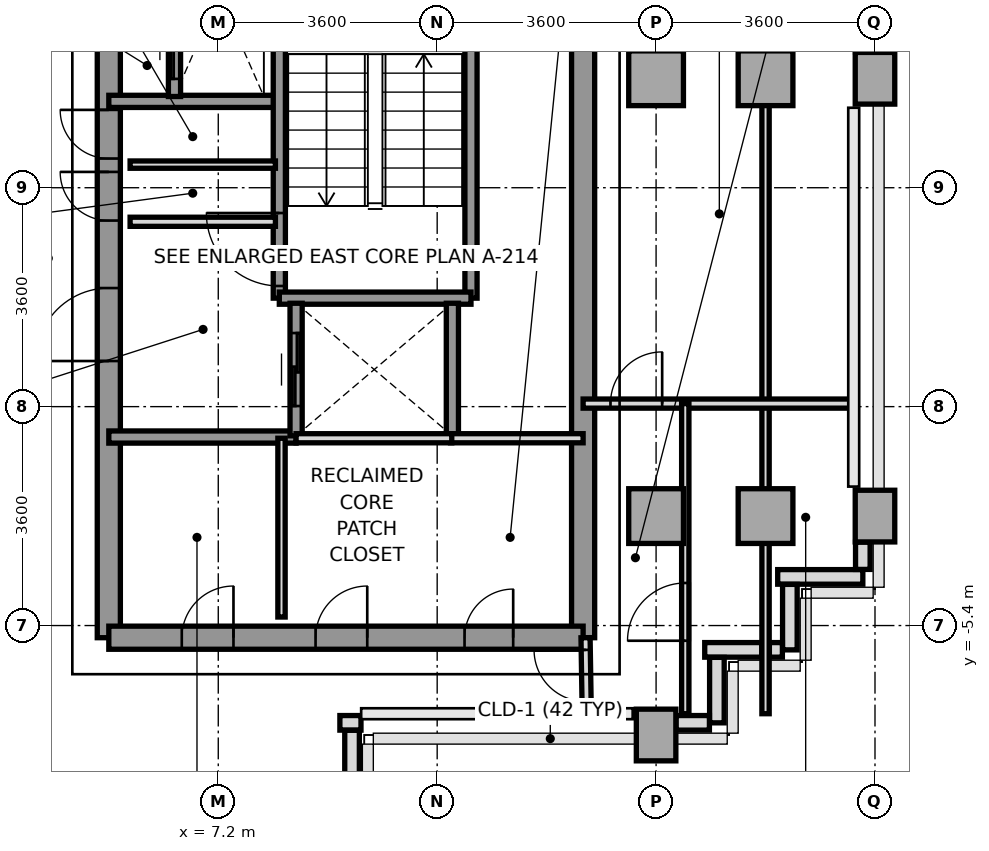
"""IFC4 building model, lengths in metres.
Left out: names, types, materials, properties, quantities, classifications, styles, units other than length and angle.
Written with IfcOpenShell. Run it as: python <this file> out.ifc"""

import sys

from ifc_helpers import new_model, si_unit, direction, frame, frame_2d, origin, origin_2d, place, context, subcontext, project, spatial, rectangle, extrude, source, transform, mapped, element, fill, save


model = new_model("IFC4")
c1 = context("Model", 3, precision=1e-05, world=origin(), true_north=direction((0.0, 1.0)))
c2 = subcontext(c1, "Body", "Model", "MODEL_VIEW")
j1 = project(units=[si_unit("LENGTHUNIT", "METRE"), si_unit("PLANEANGLEUNIT", "RADIAN")], contexts=[c1])
p1 = place(None, origin())
s1 = spatial("IfcSite", under=j1, at=p1, CompositionType="ELEMENT")
p2 = place(p1, origin())
s2 = spatial("IfcBuilding", under=s1, at=p2, CompositionType="ELEMENT")
p3 = place(p2, frame((0.0, 0.0, 187.6)))
s3 = spatial("IfcBuildingStorey", under=s2, at=p3, CompositionType="ELEMENT", Elevation=187.6)
m1 = source(origin(), c2, "Body", "SweptSolid", [
    extrude(rectangle(XDim=0.65, YDim=0.85, at=origin_2d()), origin(), (0.0, 0.0, 1.0), 3.2),
])
p4 = place(p3, frame((14.4, -7.2, 0.0), z_axis=(0.0, 0.0, 1.0), x_axis=(1.0, 0.0, 0.0)))
e1 = element("IfcColumn", 1, at=p4, inside=s3, PredefinedType="COLUMN", context=c2, shape_type="MappedRepresentation", body=[
    mapped(m1, transform((0.0, 0.0, 0.0), x_axis=(1.0, 0.0, 0.0), y_axis=(0.0, 1.0, 0.0), z_axis=(0.0, 0.0, 1.0), scale=1.0)),
])
m2 = source(origin(), c2, "Body", "SweptSolid", [
    extrude(rectangle(XDim=0.9, YDim=0.9, at=origin_2d()), origin(), (0.0, 0.0, 1.0), 3.2),
])
for number, where, z_axis, x_axis in (
    (2, (14.4, -3.6, 0.0), (0.0, 0.0, 1.0), (1.0, 0.0, 0.0)),
    (3, (14.4, 3.6, 0.0), (0.0, 0.0, 1.0), (1.0, 0.0, 0.0)),
    (4, (16.2, -3.6, 0.0), (0.0, 0.0, 1.0), (1.0, 0.0, 0.0)),
    (5, (16.2, 3.6, 0.0), (0.0, 0.0, 1.0), (1.0, 0.0, 0.0)),
):
    element("IfcColumn", number, at=place(p3, frame(where, z_axis=z_axis, x_axis=x_axis)), inside=s3, PredefinedType="COLUMN", context=c2, shape_type="MappedRepresentation", body=[
        mapped(m2, transform((0.0, 0.0, 0.0), x_axis=(1.0, 0.0, 0.0), y_axis=(0.0, 1.0, 0.0), z_axis=(0.0, 0.0, 1.0), scale=1.0)),
    ])
for number, where, z_axis, x_axis in (
    (6, (18.0, -3.6, 0.0), (0.0, 0.0, 1.0), (1.0, 0.0, 0.0)),
    (7, (18.0, 3.6, 0.0), (0.0, 0.0, 1.0), (1.0, 0.0, 0.0)),
):
    element("IfcColumn", number, at=place(p3, frame(where, z_axis=z_axis, x_axis=x_axis)), inside=s3, PredefinedType="COLUMN", context=c2, shape_type="MappedRepresentation", body=[
        mapped(m1, transform((0.0, 0.0, 0.0), x_axis=(1.0, 0.0, 0.0), y_axis=(0.0, 1.0, 0.0), z_axis=(0.0, 0.0, 1.0), scale=1.0)),
    ])
p5 = place(p3, frame((17.8, -4.6, 0.0), z_axis=(0.0, 0.0, 1.0), x_axis=(-1.0, 0.0, 0.0)))
e8 = element("IfcWall", 8, at=p5, inside=s3, PredefinedType="PARAPET", context=c2, shape_type="SweptSolid", body=[
    extrude(rectangle(XDim=1.4, YDim=0.24, at=frame_2d((0.7, 0.0))), origin(), (0.0, 0.0, 1.0), 1.15),
])
p6 = place(p3, frame((16.6, -4.723, 0.0), z_axis=(0.0, 0.0, 1.0), x_axis=(0.0, -1.0, 0.0)))
e9 = element("IfcWall", 9, at=p6, inside=s3, PredefinedType="PARAPET", context=c2, shape_type="SweptSolid", body=[
    extrude(rectangle(XDim=1.077, YDim=0.24, at=frame_2d((0.539, 0.0))), origin(), (0.0, 0.0, 1.0), 1.15),
])
p7 = place(p3, frame((16.477, -5.8, 0.0), z_axis=(0.0, 0.0, 1.0), x_axis=(-1.0, 0.0, 0.0)))
e10 = element("IfcWall", 10, at=p7, inside=s3, PredefinedType="PARAPET", context=c2, shape_type="SweptSolid", body=[
    extrude(rectangle(XDim=0.214, YDim=0.24, at=frame_2d((0.107, 0.0))), origin(), (0.0, 0.0, 1.0), 1.15),
])
p8 = place(p3, frame((16.137, -5.8, 0.0), z_axis=(0.0, 0.0, 1.0), x_axis=(-1.0, 0.0, 0.0)))
e11 = element("IfcWall", 11, at=p8, inside=s3, PredefinedType="PARAPET", context=c2, shape_type="SweptSolid", body=[
    extrude(rectangle(XDim=0.937, YDim=0.24, at=frame_2d((0.469, 0.0))), origin(), (0.0, 0.0, 1.0), 1.15),
])
p9 = place(p3, frame((15.4, -5.923, 0.0), z_axis=(0.0, 0.0, 1.0), x_axis=(0.0, -1.0, 0.0)))
e12 = element("IfcWall", 12, at=p9, inside=s3, PredefinedType="PARAPET", context=c2, shape_type="SweptSolid", body=[
    extrude(rectangle(XDim=1.077, YDim=0.24, at=frame_2d((0.539, 0.0))), origin(), (0.0, 0.0, 1.0), 1.15),
])
p10 = place(p3, frame((15.277, -7.0, 0.0), z_axis=(0.0, 0.0, 1.0), x_axis=(-1.0, 0.0, 0.0)))
e13 = element("IfcWall", 13, at=p10, inside=s3, PredefinedType="PARAPET", context=c2, shape_type="SweptSolid", body=[
    extrude(rectangle(XDim=0.549, YDim=0.24, at=frame_2d((0.274, 0.0))), origin(), (0.0, 0.0, 1.0), 1.15),
])
p11 = place(p3, frame((9.547, -7.0, 0.0), z_axis=(0.0, 0.0, 1.0), x_axis=(-1.0, 0.0, 0.0)))
e14 = element("IfcWall", 14, at=p11, inside=s3, PredefinedType="PARAPET", context=c2, shape_type="SweptSolid", body=[
    extrude(rectangle(XDim=0.347, YDim=0.24, at=frame_2d((0.174, 0.0))), origin(), (0.0, 0.0, 1.0), 1.15),
])
p12 = place(p3, frame((9.4, -7.123, 0.0), z_axis=(0.0, 0.0, 1.0), x_axis=(0.0, -1.0, 0.0)))
e15 = element("IfcWall", 15, at=p12, inside=s3, PredefinedType="PARAPET", context=c2, shape_type="SweptSolid", body=[
    extrude(rectangle(XDim=1.424, YDim=0.24, at=frame_2d((0.712, 0.0))), origin(), (0.0, 0.0, 1.0), 1.15),
])
for number, where, z_axis, x_axis in (
    (16, (17.8, 4.477, 0.0), (0.0, 0.0, 1.0), (0.0, -1.0, 0.0)),
    (17, (17.8, -4.028, 0.0), (0.0, 0.0, 1.0), (0.0, -1.0, 0.0)),
):
    element("IfcWall", number, at=place(p3, frame(where, z_axis=z_axis, x_axis=x_axis)), inside=s3, PredefinedType="PARAPET", context=c2, shape_type="SweptSolid", body=[
        extrude(rectangle(XDim=0.449, YDim=0.24, at=frame_2d((0.225, 0.0))), origin(), (0.0, 0.0, 1.0), 1.15),
    ])
p13 = place(p3, frame((13.2, -5.6, 0.0), z_axis=(0.0, 0.0, 1.0), x_axis=(0.0, 1.0, 0.0)))
e18 = element("IfcWall", 18, at=p13, inside=s3, PredefinedType="SHEAR", context=c2, shape_type="SweptSolid", body=[
    extrude(rectangle(XDim=11.2, YDim=0.38, at=frame_2d((5.6, 0.0))), origin(), (0.0, 0.0, 1.0), 3.2),
])
p14 = place(p3, frame((5.4, -5.6, 0.0), z_axis=(0.0, 0.0, 1.0), x_axis=(0.0, 1.0, 0.0)))
e19 = element("IfcWall", 19, at=p14, inside=s3, PredefinedType="SHEAR", context=c2, shape_type="SweptSolid", body=[
    extrude(rectangle(XDim=12.5, YDim=0.38, at=frame_2d((6.25, 0.0))), origin(), (0.0, 0.0, 1.0), 3.2),
])
p15 = place(p14, frame((4.55, 0.0, 0.0)))
e20 = element("IfcOpeningElement", 20, at=p15, cuts=e19, PredefinedType="OPENING", context=c2, shape_type="SweptSolid", body=[
    extrude(rectangle(XDim=1.2, YDim=2.2, at=frame_2d((0.6, 1.1))), frame((0.0, 0.2, 0.0), z_axis=(0.0, -1.0, 0.0), x_axis=(1.0, 0.0, 0.0)), (0.0, 0.0, 1.0), 0.4),
])
p16 = place(p14, frame((10.45, 0.0, 0.0)))
e21 = element("IfcOpeningElement", 21, at=p16, cuts=e19, PredefinedType="OPENING", context=c2, shape_type="SweptSolid", body=[
    extrude(rectangle(XDim=1.2, YDim=2.2, at=frame_2d((0.6, 1.1))), frame((0.0, 0.2, 0.0), z_axis=(0.0, -1.0, 0.0), x_axis=(1.0, 0.0, 0.0)), (0.0, 0.0, 1.0), 0.4),
])
p17 = place(p14, frame((6.86, 0.0, 0.0)))
e22 = element("IfcOpeningElement", 22, at=p17, cuts=e19, PredefinedType="OPENING", context=c2, shape_type="SweptSolid", body=[
    extrude(rectangle(XDim=0.8, YDim=2.1, at=frame_2d((0.4, 1.05))), frame((0.0, 0.2, 0.0), z_axis=(0.0, -1.0, 0.0), x_axis=(1.0, 0.0, 0.0)), (0.0, 0.0, 1.0), 0.4),
])
p18 = place(p14, frame((7.88, 0.0, 0.0)))
e23 = element("IfcOpeningElement", 23, at=p18, cuts=e19, PredefinedType="OPENING", context=c2, shape_type="SweptSolid", body=[
    extrude(rectangle(XDim=0.8, YDim=2.1, at=frame_2d((0.4, 1.05))), frame((0.0, 0.2, 0.0), z_axis=(0.0, -1.0, 0.0), x_axis=(1.0, 0.0, 0.0)), (0.0, 0.0, 1.0), 0.4),
])
p19 = place(p3, frame((5.4, -5.6, 0.0), z_axis=(0.0, 0.0, 1.0), x_axis=(1.0, 0.0, 0.0)))
e24 = element("IfcWall", 24, at=p19, inside=s3, PredefinedType="SHEAR", context=c2, shape_type="SweptSolid", body=[
    extrude(rectangle(XDim=7.8, YDim=0.38, at=frame_2d((3.9, 0.0))), origin(), (0.0, 0.0, 1.0), 3.2),
])
p20 = place(p19, frame((5.85, 0.0, 0.0)))
e25 = element("IfcOpeningElement", 25, at=p20, cuts=e24, PredefinedType="OPENING", context=c2, shape_type="SweptSolid", body=[
    extrude(rectangle(XDim=0.8, YDim=2.1, at=frame_2d((0.4, 1.05))), frame((0.0, 0.2, 0.0), z_axis=(0.0, -1.0, 0.0), x_axis=(1.0, 0.0, 0.0)), (0.0, 0.0, 1.0), 0.4),
])
p21 = place(p19, frame((1.2, 0.0, 0.0)))
e26 = element("IfcOpeningElement", 26, at=p21, cuts=e24, PredefinedType="OPENING", context=c2, shape_type="SweptSolid", body=[
    extrude(rectangle(XDim=0.85, YDim=2.1, at=frame_2d((0.425, 1.05))), frame((0.0, 0.2, 0.0), z_axis=(0.0, -1.0, 0.0), x_axis=(1.0, 0.0, 0.0)), (0.0, 0.0, 1.0), 0.4),
])
p22 = place(p19, frame((3.4, 0.0, 0.0)))
e27 = element("IfcOpeningElement", 27, at=p22, cuts=e24, PredefinedType="OPENING", context=c2, shape_type="SweptSolid", body=[
    extrude(rectangle(XDim=0.85, YDim=2.1, at=frame_2d((0.425, 1.05))), frame((0.0, 0.2, 0.0), z_axis=(0.0, -1.0, 0.0), x_axis=(1.0, 0.0, 0.0)), (0.0, 0.0, 1.0), 0.4),
])
p23 = place(p3, frame((5.4, 3.22, 0.0), z_axis=(0.0, 0.0, 1.0), x_axis=(1.0, 0.0, 0.0)))
e28 = element("IfcWall", 28, at=p23, inside=s3, PredefinedType="SOLIDWALL", context=c2, shape_type="SweptSolid", body=[
    extrude(rectangle(XDim=2.78, YDim=0.2, at=frame_2d((1.39, 0.0))), origin(), (0.0, 0.0, 1.0), 3.2),
])
p24 = place(p3, frame((5.4, -2.3, 0.0), z_axis=(0.0, 0.0, 1.0), x_axis=(1.0, 0.0, 0.0)))
e29 = element("IfcWall", 29, at=p24, inside=s3, PredefinedType="SOLIDWALL", context=c2, shape_type="SweptSolid", body=[
    extrude(rectangle(XDim=3.08, YDim=0.2, at=frame_2d((1.54, 0.0))), origin(), (0.0, 0.0, 1.0), 3.2),
])
p25 = place(p3, frame((8.204, -0.016, 0.0), z_axis=(0.0, 0.0, 1.0), x_axis=(0.0, 1.0, 0.0)))
e30 = element("IfcWall", 30, at=p25, inside=s3, PredefinedType="SOLIDWALL", context=c2, shape_type="SweptSolid", body=[
    extrude(rectangle(XDim=6.916, YDim=0.2, at=frame_2d((3.458, 0.0))), origin(), (0.0, 0.0, 1.0), 3.2),
])
p26 = place(p25, frame((0.2, 0.0, 0.0)))
e31 = element("IfcOpeningElement", 31, at=p26, cuts=e30, PredefinedType="OPENING", context=c2, shape_type="SweptSolid", body=[
    extrude(rectangle(XDim=1.2, YDim=2.2, at=frame_2d((0.6, 1.1))), frame((0.0, 0.11, 0.0), z_axis=(0.0, -1.0, 0.0), x_axis=(1.0, 0.0, 0.0)), (0.0, 0.0, 1.0), 0.22),
])
p27 = place(p3, frame((11.356, -0.016, 0.0), z_axis=(0.0, 0.0, 1.0), x_axis=(0.0, 1.0, 0.0)))
e32 = element("IfcWall", 32, at=p27, inside=s3, PredefinedType="SOLIDWALL", context=c2, shape_type="SweptSolid", body=[
    extrude(rectangle(XDim=6.916, YDim=0.2, at=frame_2d((3.458, 0.0))), origin(), (0.0, 0.0, 1.0), 3.2),
])
p28 = place(p3, frame((8.204, -0.016, 0.0), z_axis=(0.0, 0.0, 1.0), x_axis=(1.0, 0.0, 0.0)))
e33 = element("IfcWall", 33, at=p28, inside=s3, PredefinedType="SOLIDWALL", context=c2, shape_type="SweptSolid", body=[
    extrude(rectangle(XDim=3.152, YDim=0.2, at=frame_2d((1.576, 0.0))), origin(), (0.0, 0.0, 1.0), 3.2),
])
p29 = place(p3, frame((8.48, -2.28, 0.0), z_axis=(0.0, 0.0, 1.0), x_axis=(0.0, 1.0, 0.0)))
e34 = element("IfcWall", 34, at=p29, inside=s3, PredefinedType="SOLIDWALL", context=c2, shape_type="SweptSolid", body=[
    extrude(rectangle(XDim=2.18, YDim=0.2, at=frame_2d((1.09, 0.0))), origin(), (0.0, 0.0, 1.0), 3.2),
])
p30 = place(p29, frame((0.49, 0.0, 0.0)))
e35 = element("IfcOpeningElement", 35, at=p30, cuts=e34, PredefinedType="OPENING", context=c2, shape_type="SweptSolid", body=[
    extrude(rectangle(XDim=1.2, YDim=2.2, at=frame_2d((0.6, 1.1))), frame((0.0, 0.11, 0.0), z_axis=(0.0, -1.0, 0.0), x_axis=(1.0, 0.0, 0.0)), (0.0, 0.0, 1.0), 0.22),
])
p31 = place(p3, frame((11.05, -2.28, 0.0), z_axis=(0.0, 0.0, 1.0), x_axis=(0.0, 1.0, 0.0)))
e36 = element("IfcWall", 36, at=p31, inside=s3, PredefinedType="SOLIDWALL", context=c2, shape_type="SweptSolid", body=[
    extrude(rectangle(XDim=2.18, YDim=0.2, at=frame_2d((1.09, 0.0))), origin(), (0.0, 0.0, 1.0), 3.2),
])
p32 = place(p3, frame((6.48, 3.3, 0.0), z_axis=(0.0, 0.0, 1.0), x_axis=(0.0, 1.0, 0.0)))
e37 = element("IfcWall", 37, at=p32, inside=s3, PredefinedType="SOLIDWALL", context=c2, shape_type="SweptSolid", body=[
    extrude(rectangle(XDim=1.68, YDim=0.2, at=frame_2d((0.84, 0.0))), origin(), (0.0, 0.0, 1.0), 3.2),
])
p33 = place(p32, frame((0.29, 0.0, 0.0)))
e38 = element("IfcOpeningElement", 38, at=p33, cuts=e37, PredefinedType="OPENING", context=c2, shape_type="SweptSolid", body=[
    extrude(rectangle(XDim=1.1, YDim=2.2, at=frame_2d((0.55, 1.1))), frame((0.0, 0.11, 0.0), z_axis=(0.0, -1.0, 0.0), x_axis=(1.0, 0.0, 0.0)), (0.0, 0.0, 1.0), 0.22),
])
p34 = place(p3, frame((5.75, 1.24, 0.0), z_axis=(0.0, 0.0, 1.0), x_axis=(1.0, 0.0, 0.0)))
e39 = element("IfcWall", 39, at=p34, inside=s3, PredefinedType="PARTITIONING", context=c2, shape_type="SweptSolid", body=[
    extrude(rectangle(XDim=2.39, YDim=0.15, at=frame_2d((1.195, 0.0))), origin(), (0.0, 0.0, 1.0), 2.3),
])
p35 = place(p3, frame((5.75, 2.18, 0.0), z_axis=(0.0, 0.0, 1.0), x_axis=(1.0, 0.0, 0.0)))
e40 = element("IfcWall", 40, at=p35, inside=s3, PredefinedType="PARTITIONING", context=c2, shape_type="SweptSolid", body=[
    extrude(rectangle(XDim=2.39, YDim=0.12, at=frame_2d((1.195, 0.0))), origin(), (0.0, 0.0, 1.0), 2.3),
])
p36 = place(p3, frame((11.02, -2.32, 0.0), z_axis=(0.0, 0.0, 1.0), x_axis=(1.0, 0.0, 0.0)))
e41 = element("IfcWall", 41, at=p36, inside=s3, PredefinedType="PARTITIONING", context=c2, shape_type="SweptSolid", body=[
    extrude(rectangle(XDim=2.18, YDim=0.15, at=frame_2d((1.09, 0.0))), origin(), (0.0, 0.0, 1.0), 3.2),
])
p37 = place(p3, frame((8.24, -5.26, 0.0), z_axis=(0.0, 0.0, 1.0), x_axis=(0.0, 1.0, 0.0)))
e42 = element("IfcWall", 42, at=p37, inside=s3, PredefinedType="PARTITIONING", context=c2, shape_type="SweptSolid", body=[
    extrude(rectangle(XDim=2.94, YDim=0.12, at=frame_2d((1.47, 0.0))), origin(), (0.0, 0.0, 1.0), 3.2),
])
p38 = place(p3, frame((8.48, -2.32, 0.0), z_axis=(0.0, 0.0, 1.0), x_axis=(1.0, 0.0, 0.0)))
e43 = element("IfcWall", 43, at=p38, inside=s3, PredefinedType="PARTITIONING", context=c2, shape_type="SweptSolid", body=[
    extrude(rectangle(XDim=2.56, YDim=0.15, at=frame_2d((1.28, 0.0))), origin(), (0.0, 0.0, 1.0), 3.2),
])
p39 = place(p3, frame((13.26, -6.85, 0.0), z_axis=(0.0, 0.0, 1.0), x_axis=(-0.016013571389, 0.999871774545, 0.0)))
e44 = element("IfcWall", 44, at=p39, inside=s3, PredefinedType="PARTITIONING", context=c2, shape_type="SweptSolid", body=[
    extrude(rectangle(XDim=1.25, YDim=0.15, at=frame_2d((0.625, 0.0))), origin(), (0.0, 0.0, 1.0), 3.2),
])
p40 = place(p39, frame((0.2, 0.0, 0.0)))
e45 = element("IfcOpeningElement", 45, at=p40, cuts=e44, PredefinedType="OPENING", context=c2, shape_type="SweptSolid", body=[
    extrude(rectangle(XDim=0.85, YDim=2.1, at=frame_2d((0.425, 1.05))), frame((0.0, 0.085, 0.0), z_axis=(0.0, -1.0, 0.0), x_axis=(1.0, 0.0, 0.0)), (0.0, 0.0, 1.0), 0.17),
])
p41 = place(p3, frame((16.2, -6.85, 0.0), z_axis=(0.0, 0.0, 1.0), x_axis=(0.0, 1.0, 0.0)))
e46 = element("IfcWall", 46, at=p41, inside=s3, PredefinedType="PARTITIONING", context=c2, shape_type="SweptSolid", body=[
    extrude(rectangle(XDim=13.7, YDim=0.12, at=frame_2d((6.85, 0.0))), origin(), (0.0, 0.0, 1.0), 2.8),
])
p42 = place(p3, frame((13.2, -1.75, 0.0), z_axis=(0.0, 0.0, 1.0), x_axis=(1.0, 0.0, 0.0)))
e47 = element("IfcWall", 47, at=p42, inside=s3, PredefinedType="PARTITIONING", context=c2, shape_type="SweptSolid", body=[
    extrude(rectangle(XDim=4.45, YDim=0.15, at=frame_2d((2.225, 0.0))), origin(), (0.0, 0.0, 1.0), 2.8),
])
p43 = place(p42, frame((0.45, 0.0, 0.0)))
e48 = element("IfcOpeningElement", 48, at=p43, cuts=e47, PredefinedType="OPENING", context=c2, shape_type="SweptSolid", body=[
    extrude(rectangle(XDim=0.85, YDim=2.1, at=frame_2d((0.425, 1.05))), frame((0.0, 0.085, 0.0), z_axis=(0.0, -1.0, 0.0), x_axis=(1.0, 0.0, 0.0)), (0.0, 0.0, 1.0), 0.17),
])
p44 = place(p3, frame((14.88, -6.85, 0.0), z_axis=(0.0, 0.0, 1.0), x_axis=(0.0, 1.0, 0.0)))
e49 = element("IfcWall", 49, at=p44, inside=s3, PredefinedType="PARTITIONING", context=c2, shape_type="SweptSolid", body=[
    extrude(rectangle(XDim=5.1, YDim=0.12, at=frame_2d((2.55, 0.0))), origin(), (0.0, 0.0, 1.0), 3.2),
])
p45 = place(p44, frame((1.2, 0.0, 0.0)))
e50 = element("IfcOpeningElement", 50, at=p45, cuts=e49, PredefinedType="OPENING", context=c2, shape_type="SweptSolid", body=[
    extrude(rectangle(XDim=0.95, YDim=2.15, at=frame_2d((0.475, 1.075))), frame((0.0, 0.07, 0.0), z_axis=(0.0, -1.0, 0.0), x_axis=(1.0, 0.0, 0.0)), (0.0, 0.0, 1.0), 0.14),
])
m3 = source(origin(), c2, "Body", "SweptSolid", [
    extrude(rectangle(XDim=1.2, YDim=2.2, at=frame_2d((0.6, 1.1))), frame((0.0, 0.025, 0.0), z_axis=(0.0, -1.0, 0.0), x_axis=(1.0, 0.0, 0.0)), (0.0, 0.0, 1.0), 0.05),
])
p46 = place(p26, origin())
e51 = element("IfcDoor", 51, at=p46, inside=s3, OperationType="SINGLE_SWING_RIGHT", PredefinedType="DOOR", context=c2, shape_type="MappedRepresentation", body=[
    mapped(m3, transform((0.0, 0.0, 0.0), x_axis=(1.0, 0.0, 0.0), y_axis=(0.0, 1.0, 0.0), z_axis=(0.0, 0.0, 1.0), scale=1.0)),
])
fill(e31, e51)
p47 = place(p15, origin())
e52 = element("IfcDoor", 52, at=p47, inside=s3, OperationType="SINGLE_SWING_LEFT", PredefinedType="DOOR", context=c2, shape_type="MappedRepresentation", body=[
    mapped(m3, transform((0.0, 0.0, 0.0), x_axis=(1.0, 0.0, 0.0), y_axis=(0.0, 1.0, 0.0), z_axis=(0.0, 0.0, 1.0), scale=1.0)),
])
fill(e20, e52)
m4 = source(origin(), c2, "Body", "SweptSolid", [
    extrude(rectangle(XDim=0.8, YDim=2.1, at=frame_2d((0.4, 1.05))), frame((0.0, 0.025, 0.0), z_axis=(0.0, -1.0, 0.0), x_axis=(1.0, 0.0, 0.0)), (0.0, 0.0, 1.0), 0.05),
])
p48 = place(p17, origin())
e53 = element("IfcDoor", 53, at=p48, inside=s3, OperationType="SINGLE_SWING_RIGHT", PredefinedType="DOOR", context=c2, shape_type="MappedRepresentation", body=[
    mapped(m4, transform((0.0, 0.0, 0.0), x_axis=(1.0, 0.0, 0.0), y_axis=(0.0, 1.0, 0.0), z_axis=(0.0, 0.0, 1.0), scale=1.0)),
])
fill(e22, e53)
p49 = place(p18, origin())
e54 = element("IfcDoor", 54, at=p49, inside=s3, OperationType="SINGLE_SWING_RIGHT", PredefinedType="DOOR", context=c2, shape_type="MappedRepresentation", body=[
    mapped(m4, transform((0.0, 0.0, 0.0), x_axis=(1.0, 0.0, 0.0), y_axis=(0.0, 1.0, 0.0), z_axis=(0.0, 0.0, 1.0), scale=1.0)),
])
fill(e23, e54)
p50 = place(p20, origin())
e55 = element("IfcDoor", 55, at=p50, inside=s3, OperationType="SINGLE_SWING_RIGHT", PredefinedType="DOOR", context=c2, shape_type="MappedRepresentation", body=[
    mapped(m4, transform((0.0, 0.0, 0.0), x_axis=(1.0, 0.0, 0.0), y_axis=(0.0, 1.0, 0.0), z_axis=(0.0, 0.0, 1.0), scale=1.0)),
])
fill(e25, e55)
m5 = source(origin(), c2, "Body", "SweptSolid", [
    extrude(rectangle(XDim=0.85, YDim=2.1, at=frame_2d((0.425, 1.05))), frame((0.0, 0.025, 0.0), z_axis=(0.0, -1.0, 0.0), x_axis=(1.0, 0.0, 0.0)), (0.0, 0.0, 1.0), 0.05),
])
p51 = place(p21, origin())
e56 = element("IfcDoor", 56, at=p51, inside=s3, OperationType="SINGLE_SWING_RIGHT", PredefinedType="DOOR", context=c2, shape_type="MappedRepresentation", body=[
    mapped(m5, transform((0.0, 0.0, 0.0), x_axis=(1.0, 0.0, 0.0), y_axis=(0.0, 1.0, 0.0), z_axis=(0.0, 0.0, 1.0), scale=1.0)),
])
fill(e26, e56)
p52 = place(p22, origin())
e57 = element("IfcDoor", 57, at=p52, inside=s3, OperationType="SINGLE_SWING_RIGHT", PredefinedType="DOOR", context=c2, shape_type="MappedRepresentation", body=[
    mapped(m5, transform((0.0, 0.0, 0.0), x_axis=(1.0, 0.0, 0.0), y_axis=(0.0, 1.0, 0.0), z_axis=(0.0, 0.0, 1.0), scale=1.0)),
])
fill(e27, e57)
p53 = place(p30, origin())
e58 = element("IfcDoor", 58, at=p53, inside=s3, OperationType="SLIDING_TO_RIGHT", PredefinedType="DOOR", context=c2, shape_type="MappedRepresentation", body=[
    mapped(m3, transform((0.0, 0.0, 0.0), x_axis=(1.0, 0.0, 0.0), y_axis=(0.0, 1.0, 0.0), z_axis=(0.0, 0.0, 1.0), scale=1.0)),
])
fill(e35, e58)
m6 = source(origin(), c2, "Body", "SweptSolid", [
    extrude(rectangle(XDim=1.1, YDim=2.2, at=frame_2d((0.55, 1.1))), frame((0.0, 0.025, 0.0), z_axis=(0.0, -1.0, 0.0), x_axis=(1.0, 0.0, 0.0)), (0.0, 0.0, 1.0), 0.05),
])
p54 = place(p33, origin())
e59 = element("IfcDoor", 59, at=p54, inside=s3, OperationType="SLIDING_TO_LEFT", PredefinedType="DOOR", context=c2, shape_type="MappedRepresentation", body=[
    mapped(m6, transform((0.0, 0.0, 0.0), x_axis=(1.0, 0.0, 0.0), y_axis=(0.0, 1.0, 0.0), z_axis=(0.0, 0.0, 1.0), scale=1.0)),
])
fill(e38, e59)
p55 = place(p40, origin())
e60 = element("IfcDoor", 60, at=p55, inside=s3, OperationType="SINGLE_SWING_RIGHT", PredefinedType="DOOR", context=c2, shape_type="MappedRepresentation", body=[
    mapped(m5, transform((0.0, 0.0, 0.0), x_axis=(1.0, 0.0, 0.0), y_axis=(0.0, 1.0, 0.0), z_axis=(0.0, 0.0, 1.0), scale=1.0)),
])
fill(e45, e60)
m7 = source(origin(), c2, "Body", "SweptSolid", [
    extrude(rectangle(XDim=0.95, YDim=2.15, at=frame_2d((0.475, 1.075))), frame((0.0, 0.025, 0.0), z_axis=(0.0, -1.0, 0.0), x_axis=(1.0, 0.0, 0.0)), (0.0, 0.0, 1.0), 0.05),
])
p56 = place(p45, origin())
e61 = element("IfcDoor", 61, at=p56, inside=s3, OperationType="SINGLE_SWING_LEFT", PredefinedType="DOOR", context=c2, shape_type="MappedRepresentation", body=[
    mapped(m7, transform((0.0, 0.0, 0.0), x_axis=(1.0, 0.0, 0.0), y_axis=(0.0, 1.0, 0.0), z_axis=(0.0, 0.0, 1.0), scale=1.0)),
])
fill(e50, e61)
p57 = place(p43, origin())
e62 = element("IfcDoor", 62, at=p57, inside=s3, OperationType="SINGLE_SWING_RIGHT", PredefinedType="DOOR", context=c2, shape_type="MappedRepresentation", body=[
    mapped(m5, transform((0.0, 0.0, 0.0), x_axis=(1.0, 0.0, 0.0), y_axis=(0.0, 1.0, 0.0), z_axis=(0.0, 0.0, 1.0), scale=1.0)),
])
fill(e48, e62)
save(model, sys.argv[1])
